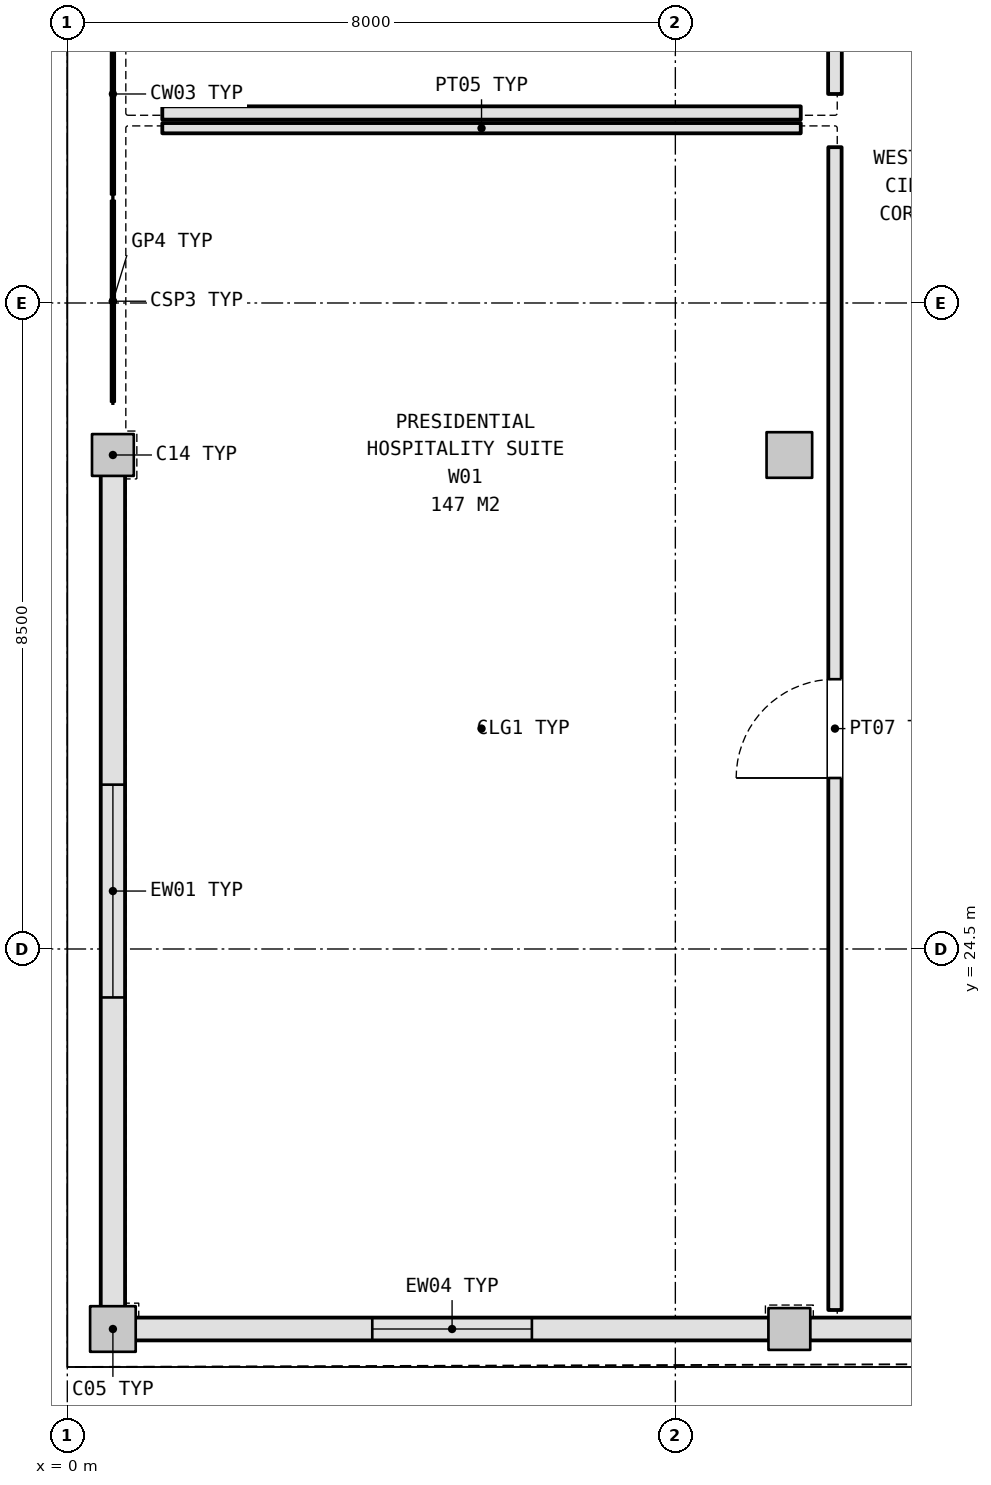
"""IFC4 building model, lengths in metres.
Left out: names, types, materials, properties, quantities, classifications, styles, units other than length and angle.
Written with IfcOpenShell. Run it as: python <this file> out.ifc"""

import sys

from ifc_helpers import new_model, si_unit, direction, frame, frame_2d, origin, origin_2d, place, context, subcontext, project, spatial, rectangle, extrude, element, fill, save


model = new_model("IFC4")
c1 = context("Model", 3, precision=1e-05, world=origin(), true_north=direction((0.0, 1.0)))
c2 = subcontext(c1, "Body", "Model", "MODEL_VIEW")
j1 = project(units=[si_unit("LENGTHUNIT", "METRE"), si_unit("PLANEANGLEUNIT", "RADIAN")], contexts=[c1])
p1 = place(None, origin())
s1 = spatial("IfcSite", under=j1, at=p1, CompositionType="ELEMENT")
p2 = place(p1, origin())
s2 = spatial("IfcBuilding", under=s1, at=p2, CompositionType="ELEMENT")
p3 = place(p2, frame((0.0, 0.0, 16.2)))
s3 = spatial("IfcBuildingStorey", under=s2, at=p3, CompositionType="ELEMENT", Elevation=16.2)
p4 = place(p3, frame((0.6, 19.5, 0.0), z_axis=(0.0, 0.0, 1.0), x_axis=(1.0, 0.0, 0.0)))
e1 = element("IfcColumn", 1, at=p4, inside=s3, PredefinedType="COLUMN", context=c2, shape_type="SweptSolid", body=[
    extrude(rectangle(XDim=0.6, YDim=0.6, at=origin_2d()), origin(), (0.0, 0.0, 1.0), 5.4),
])
for number, where, z_axis, x_axis in (
    (2, (0.6, 31.0, 0.0), (0.0, 0.0, 1.0), (1.0, 0.0, 0.0)),
    (3, (9.5, 19.5, 0.0), (0.0, 0.0, 1.0), (1.0, 0.0, 0.0)),
):
    element("IfcColumn", number, at=place(p3, frame(where, z_axis=z_axis, x_axis=x_axis)), inside=s3, PredefinedType="COLUMN", context=c2, shape_type="SweptSolid", body=[
        extrude(rectangle(XDim=0.55, YDim=0.55, at=origin_2d()), origin(), (0.0, 0.0, 1.0), 5.4),
    ])
p5 = place(p3, frame((9.5, 31.0, 0.0), z_axis=(0.0, 0.0, 1.0), x_axis=(1.0, 0.0, 0.0)))
e4 = element("IfcColumn", 4, at=p5, inside=s3, PredefinedType="COLUMN", context=c2, shape_type="SweptSolid", body=[
    extrude(rectangle(XDim=0.6, YDim=0.6, at=origin_2d()), origin(), (0.0, 0.0, 1.0), 5.4),
])
p6 = place(p3, frame((0.6, 19.788, 0.0), z_axis=(0.0, 0.0, 1.0), x_axis=(0.0, 1.0, 0.0)))
e5 = element("IfcWall", 5, at=p6, inside=s3, PredefinedType="SOLIDWALL", context=c2, shape_type="SweptSolid", body=[
    extrude(rectangle(XDim=10.949, YDim=0.32, at=frame_2d((5.475, 0.0))), origin(), (0.0, 0.0, 1.0), 4.465),
])
p7 = place(p6, frame((4.074, 0.0, 1.05)))
e6 = element("IfcOpeningElement", 6, at=p7, cuts=e5, PredefinedType="OPENING", context=c2, shape_type="SweptSolid", body=[
    extrude(rectangle(XDim=2.8, YDim=1.4, at=frame_2d((1.4, 0.7))), frame((0.0, 0.17, 0.0), z_axis=(0.0, -1.0, 0.0), x_axis=(1.0, 0.0, 0.0)), (0.0, 0.0, 1.0), 0.34),
])
p8 = place(p3, frame((0.888, 19.5, 0.0), z_axis=(0.0, 0.0, 1.0), x_axis=(1.0, 0.0, 0.0)))
e7 = element("IfcWall", 7, at=p8, inside=s3, PredefinedType="SOLIDWALL", context=c2, shape_type="SweptSolid", body=[
    extrude(rectangle(XDim=8.349, YDim=0.3, at=frame_2d((4.175, 0.0))), origin(), (0.0, 0.0, 1.0), 4.465),
])
p9 = place(p8, frame((3.125, 0.0, 1.05)))
e8 = element("IfcOpeningElement", 8, at=p9, cuts=e7, PredefinedType="OPENING", context=c2, shape_type="SweptSolid", body=[
    extrude(rectangle(XDim=2.1, YDim=2.1, at=frame_2d((1.05, 1.05))), frame((0.0, 0.16, 0.0), z_axis=(0.0, -1.0, 0.0), x_axis=(1.0, 0.0, 0.0)), (0.0, 0.0, 1.0), 0.32),
])
p10 = place(p3, frame((9.763, 19.5, 0.0), z_axis=(0.0, 0.0, 1.0), x_axis=(1.0, 0.0, 0.0)))
e9 = element("IfcWall", 9, at=p10, inside=s3, PredefinedType="SOLIDWALL", context=c2, shape_type="SweptSolid", body=[
    extrude(rectangle(XDim=8.349, YDim=0.3, at=frame_2d((4.175, 0.0))), origin(), (0.0, 0.0, 1.0), 4.465),
])
p11 = place(p10, frame((3.125, 0.0, 1.05)))
e10 = element("IfcOpeningElement", 10, at=p11, cuts=e9, PredefinedType="OPENING", context=c2, shape_type="SweptSolid", body=[
    extrude(rectangle(XDim=2.1, YDim=2.1, at=frame_2d((1.05, 1.05))), frame((0.0, 0.16, 0.0), z_axis=(0.0, -1.0, 0.0), x_axis=(1.0, 0.0, 0.0)), (0.0, 0.0, 1.0), 0.32),
])
p12 = place(p3, frame((10.1, 35.05, 0.0), z_axis=(0.0, 0.0, 1.0), x_axis=(0.0, -1.0, 0.0)))
e11 = element("IfcWall", 11, at=p12, inside=s3, PredefinedType="PARTITIONING", context=c2, shape_type="SweptSolid", body=[
    extrude(rectangle(XDim=15.3, YDim=0.175, at=frame_2d((7.65, 0.0))), origin(), (0.0, 0.0, 1.0), 4.658),
])
p13 = place(p12, frame((7.0, 0.0, 0.0)))
e12 = element("IfcOpeningElement", 12, at=p13, cuts=e11, PredefinedType="OPENING", context=c2, shape_type="SweptSolid", body=[
    extrude(rectangle(XDim=1.3, YDim=2.2, at=frame_2d((0.65, 1.1))), frame((0.0, 0.097, 0.0), z_axis=(0.0, -1.0, 0.0), x_axis=(1.0, 0.0, 0.0)), (0.0, 0.0, 1.0), 0.195),
])
p14 = place(p3, frame((1.25, 35.3, 0.0), z_axis=(0.0, 0.0, 1.0), x_axis=(1.0, 0.0, 0.0)))
e13 = element("IfcWall", 13, at=p14, inside=s3, PredefinedType="PARTITIONING", context=c2, shape_type="SweptSolid", body=[
    extrude(rectangle(XDim=8.4, YDim=0.135, at=frame_2d((4.2, 0.0))), origin(), (0.0, 0.0, 1.0), 4.465),
])
p15 = place(p3, frame((10.1, 50.05, 0.0), z_axis=(0.0, 0.0, 1.0), x_axis=(0.0, -1.0, 0.0)))
e14 = element("IfcWall", 14, at=p15, inside=s3, PredefinedType="PARTITIONING", context=c2, shape_type="SweptSolid", body=[
    extrude(rectangle(XDim=14.3, YDim=0.18, at=frame_2d((7.15, 0.0))), origin(), (0.0, 0.0, 1.0), 4.668),
])
p16 = place(p15, frame((6.25, 0.0, 0.0)))
e15 = element("IfcOpeningElement", 15, at=p16, cuts=e14, PredefinedType="OPENING", context=c2, shape_type="SweptSolid", body=[
    extrude(rectangle(XDim=1.8, YDim=2.2, at=frame_2d((0.9, 1.1))), frame((0.0, 0.1, 0.0), z_axis=(0.0, -1.0, 0.0), x_axis=(1.0, 0.0, 0.0)), (0.0, 0.0, 1.0), 0.2),
])
p17 = place(p3, frame((9.65, 35.5, 0.0), z_axis=(0.0, 0.0, 1.0), x_axis=(-1.0, 0.0, 0.0)))
e16 = element("IfcWall", 16, at=p17, inside=s3, PredefinedType="PARTITIONING", context=c2, shape_type="SweptSolid", body=[
    extrude(rectangle(XDim=8.4, YDim=0.175, at=frame_2d((4.2, 0.0))), origin(), (0.0, 0.0, 1.0), 4.465),
])
p18 = place(p7, origin())
e17 = element("IfcWindow", 17, at=p18, inside=s3, PartitioningType="SINGLE_PANEL", PredefinedType="WINDOW", context=c2, shape_type="SweptSolid", body=[
    extrude(rectangle(XDim=2.8, YDim=1.4, at=frame_2d((1.4, 0.7))), frame((0.0, 0.03, 0.0), z_axis=(0.0, -1.0, 0.0), x_axis=(1.0, 0.0, 0.0)), (0.0, 0.0, 1.0), 0.06),
])
fill(e6, e17)
p19 = place(p9, origin())
e18 = element("IfcWindow", 18, at=p19, inside=s3, PartitioningType="SINGLE_PANEL", PredefinedType="WINDOW", context=c2, shape_type="SweptSolid", body=[
    extrude(rectangle(XDim=2.1, YDim=2.1, at=frame_2d((1.05, 1.05))), frame((0.0, 0.03, 0.0), z_axis=(0.0, -1.0, 0.0), x_axis=(1.0, 0.0, 0.0)), (0.0, 0.0, 1.0), 0.06),
])
fill(e8, e18)
p20 = place(p13, frame((1.3, 0.0, 0.0), z_axis=(0.0, 0.0, 1.0), x_axis=(-1.0, 0.0, 0.0)))
e19 = element("IfcDoor", 19, at=p20, inside=s3, OperationType="SINGLE_SWING_RIGHT", PredefinedType="DOOR", context=c2, shape_type="SweptSolid", body=[
    extrude(rectangle(XDim=1.3, YDim=2.2, at=frame_2d((0.65, 1.1))), frame((0.0, 0.025, 0.0), z_axis=(0.0, -1.0, 0.0), x_axis=(1.0, 0.0, 0.0)), (0.0, 0.0, 1.0), 0.05),
])
fill(e12, e19)
save(model, sys.argv[1])
